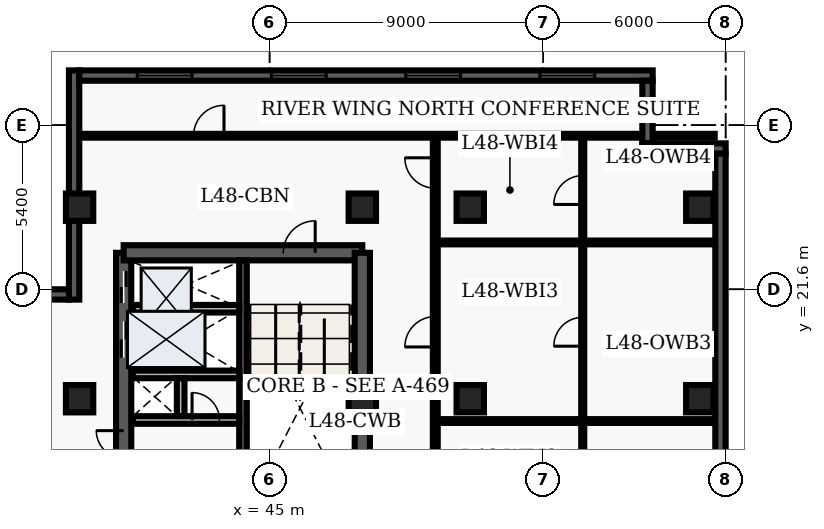
"""IFC4 building model, lengths in metres.
Left out: names, types, materials, properties, quantities, classifications, styles, units other than length and angle.
Written with IfcOpenShell. Run it as: python <this file> out.ifc"""

import sys

from ifc_helpers import new_model, entity, si_unit, converted_unit, direction, frame, origin_with_axes, origin_2d_with_axis, place, context, subcontext, project, spatial, polyline, rectangle, outline, extrude, element, fill, save


model = new_model("IFC4")
c1 = context("Model", 3, precision=1e-05, world=origin_with_axes(), true_north=direction((0.0, 1.0)))
c2 = subcontext(c1, "Body", "Model", "MODEL_VIEW")
j1 = project(units=[si_unit("LENGTHUNIT", "METRE"), converted_unit("PLANEANGLEUNIT", "DEGREE", entity("IfcPlaneAngleMeasure", 0.017), si_unit("PLANEANGLEUNIT", "RADIAN"), dimensions=[0, 0, 0, 0, 0, 0, 0])], contexts=[c1])
p1 = place(None, origin_with_axes())
s1 = spatial("IfcSite", under=j1, at=p1, CompositionType="ELEMENT")
p2 = place(p1, origin_with_axes())
s2 = spatial("IfcBuilding", under=s1, at=p2, CompositionType="ELEMENT")
p3 = place(p2, frame((0.0, 0.0, 196.5), z_axis=(0.0, 0.0, 1.0), x_axis=(1.0, 0.0, 0.0)))
s3 = spatial("IfcBuildingStorey", under=s2, at=p3, CompositionType="ELEMENT", Elevation=196.5)
p4 = place(p3, frame((40.2, 7.2, 0.0), z_axis=(0.0, 0.0, 1.0), x_axis=(0.0, 1.0, 0.0)))
e1 = element("IfcWall", 1, at=p4, inside=s3, PredefinedType="SHEAR", context=c2, shape_type="SweptSolid", body=[
    extrude(outline(polyline([(0.0, -0.25), (15.6, -0.25), (15.6, 0.25), (0.0, 0.25), (0.0, -0.25)])), origin_with_axes(), (0.0, 0.0, 1.0), 3.66),
])
p5 = place(p4, frame((14.475, 0.0, 0.0), z_axis=(0.0, 0.0, 1.0), x_axis=(1.0, 0.0, 0.0)))
e2 = element("IfcOpeningElement", 2, at=p5, cuts=e1, PredefinedType="OPENING", context=c2, shape_type="SweptSolid", body=[
    extrude(rectangle(XDim=1.05, YDim=0.52, at=origin_2d_with_axis()), origin_with_axes(), (0.0, 0.0, 1.0), 2.15),
])
p6 = place(p4, frame((12.75, 0.0, 0.0), z_axis=(0.0, 0.0, 1.0), x_axis=(1.0, 0.0, 0.0)))
e3 = element("IfcOpeningElement", 3, at=p6, cuts=e1, PredefinedType="OPENING", context=c2, shape_type="SweptSolid", body=[
    extrude(rectangle(XDim=1.2, YDim=0.52, at=origin_2d_with_axis()), origin_with_axes(), (0.0, 0.0, 1.0), 2.15),
])
p7 = place(p4, frame((9.3, 0.0, 0.0), z_axis=(0.0, 0.0, 1.0), x_axis=(1.0, 0.0, 0.0)))
e4 = element("IfcOpeningElement", 4, at=p7, cuts=e1, PredefinedType="OPENING", context=c2, shape_type="SweptSolid", body=[
    extrude(rectangle(XDim=0.9, YDim=0.52, at=origin_2d_with_axis()), origin_with_axes(), (0.0, 0.0, 1.0), 2.15),
])
p8 = place(p3, frame((40.2, 22.8, 0.0), z_axis=(0.0, 0.0, 1.0), x_axis=(1.0, 0.0, 0.0)))
e5 = element("IfcWall", 5, at=p8, inside=s3, PredefinedType="SHEAR", context=c2, shape_type="SweptSolid", body=[
    extrude(outline(polyline([(0.0, -0.25), (7.85, -0.25), (7.85, 0.25), (0.0, 0.25), (0.0, -0.25)])), origin_with_axes(), (0.0, 0.0, 1.0), 3.66),
])
p9 = place(p8, frame((5.775, 0.0, 0.0), z_axis=(0.0, 0.0, 1.0), x_axis=(1.0, 0.0, 0.0)))
e6 = element("IfcOpeningElement", 6, at=p9, cuts=e5, PredefinedType="OPENING", context=c2, shape_type="SweptSolid", body=[
    extrude(rectangle(XDim=1.05, YDim=0.52, at=origin_2d_with_axis()), origin_with_axes(), (0.0, 0.0, 1.0), 2.15),
])
p10 = place(p3, frame((48.05, 7.2, 0.0), z_axis=(0.0, 0.0, 1.0), x_axis=(0.0, 1.0, 0.0)))
e7 = element("IfcWall", 7, at=p10, inside=s3, PredefinedType="SHEAR", context=c2, shape_type="SweptSolid", body=[
    extrude(outline(polyline([(0.0, -0.25), (15.6, -0.25), (15.6, 0.25), (0.0, 0.25), (0.0, -0.25)])), origin_with_axes(), (0.0, 0.0, 1.0), 3.66),
])
p11 = place(p10, frame((5.975, 0.0, 0.0), z_axis=(0.0, 0.0, 1.0), x_axis=(1.0, 0.0, 0.0)))
e8 = element("IfcOpeningElement", 8, at=p11, cuts=e7, PredefinedType="OPENING", context=c2, shape_type="SweptSolid", body=[
    extrude(rectangle(XDim=1.05, YDim=0.52, at=origin_2d_with_axis()), origin_with_axes(), (0.0, 0.0, 1.0), 2.15),
])
p12 = place(p10, frame((2.725, 0.0, 0.0), z_axis=(0.0, 0.0, 1.0), x_axis=(1.0, 0.0, 0.0)))
e9 = element("IfcOpeningElement", 9, at=p12, cuts=e7, PredefinedType="OPENING", context=c2, shape_type="SweptSolid", body=[
    extrude(rectangle(XDim=0.95, YDim=0.52, at=origin_2d_with_axis()), origin_with_axes(), (0.0, 0.0, 1.0), 2.15),
])
p13 = place(p3, frame((44.125, 7.45, 0.0), z_axis=(0.0, 0.0, 1.0), x_axis=(0.0, 1.0, 0.0)))
e10 = element("IfcWall", 10, at=p13, inside=s3, PredefinedType="SHEAR", context=c2, shape_type="SweptSolid", body=[
    extrude(outline(polyline([(0.0, -0.125), (15.1, -0.125), (15.1, 0.125), (0.0, 0.125), (0.0, -0.125)])), origin_with_axes(), (0.0, 0.0, 1.0), 3.66),
])
p14 = place(p3, frame((40.5, 17.3, 0.0), z_axis=(0.0, 0.0, 1.0), x_axis=(1.0, 0.0, 0.0)))
e11 = element("IfcWall", 11, at=p14, inside=s3, PredefinedType="SOLIDWALL", context=c2, shape_type="SweptSolid", body=[
    extrude(outline(polyline([(0.0, -0.125), (3.5, -0.125), (3.5, 0.125), (0.0, 0.125), (0.0, -0.125)])), origin_with_axes(), (0.0, 0.0, 1.0), 2.7),
])
p15 = place(p14, frame((2.4, 0.0, 0.0), z_axis=(0.0, 0.0, 1.0), x_axis=(1.0, 0.0, 0.0)))
e12 = element("IfcOpeningElement", 12, at=p15, cuts=e11, PredefinedType="OPENING", context=c2, shape_type="SweptSolid", body=[
    extrude(rectangle(XDim=0.9, YDim=0.27, at=origin_2d_with_axis()), origin_with_axes(), (0.0, 0.0, 1.0), 2.15),
])
p16 = place(p3, frame((40.5, 18.8, 0.0), z_axis=(0.0, 0.0, 1.0), x_axis=(1.0, 0.0, 0.0)))
e13 = element("IfcWall", 13, at=p16, inside=s3, PredefinedType="SOLIDWALL", context=c2, shape_type="SweptSolid", body=[
    extrude(outline(polyline([(0.0, -0.125), (3.5, -0.125), (3.5, 0.125), (0.0, 0.125), (0.0, -0.125)])), origin_with_axes(), (0.0, 0.0, 1.0), 2.7),
])
p17 = place(p3, frame((42.075, 17.43, 0.0), z_axis=(0.0, 0.0, 1.0), x_axis=(0.0, 1.0, 0.0)))
e14 = element("IfcWall", 14, at=p17, inside=s3, PredefinedType="SOLIDWALL", context=c2, shape_type="SweptSolid", body=[
    extrude(outline(polyline([(0.0, -0.125), (1.24, -0.125), (1.24, 0.125), (0.0, 0.125), (0.0, -0.125)])), origin_with_axes(), (0.0, 0.0, 1.0), 2.7),
])
for number, where, z_axis, x_axis in (
    (15, (38.75, 18.0, 0.0), (0.0, 0.0, 1.0), (1.0, 0.0, 0.0)),
    (16, (38.75, 24.3, 0.0), (0.0, 0.0, 1.0), (1.0, 0.0, 0.0)),
    (17, (48.05, 18.0, 0.0), (0.0, 0.0, 1.0), (1.0, 0.0, 0.0)),
    (18, (48.05, 24.3, 0.0), (0.0, 0.0, 1.0), (1.0, 0.0, 0.0)),
    (19, (51.6, 18.0, 0.0), (0.0, 0.0, 1.0), (1.0, 0.0, 0.0)),
    (20, (51.6, 24.3, 0.0), (0.0, 0.0, 1.0), (1.0, 0.0, 0.0)),
    (21, (59.15, 18.0, 0.0), (0.0, 0.0, 1.0), (1.0, 0.0, 0.0)),
    (22, (59.15, 24.3, 0.0), (0.0, 0.0, 1.0), (1.0, 0.0, 0.0)),
):
    element("IfcColumn", number, at=place(p3, frame(where, z_axis=z_axis, x_axis=x_axis)), inside=s3, PredefinedType="COLUMN", context=c2, shape_type="SweptSolid", body=[
        extrude(rectangle(XDim=0.9, YDim=0.9, at=origin_2d_with_axis()), origin_with_axes(), (0.0, 0.0, 1.0), 3.9),
    ])
p18 = place(p3, frame((40.5, 20.96, 0.0), z_axis=(0.0, 0.0, 1.0), x_axis=(1.0, 0.0, 0.0)))
e23 = element("IfcWall", 23, at=p18, inside=s3, PredefinedType="SOLIDWALL", context=c2, shape_type="SweptSolid", body=[
    extrude(outline(polyline([(0.0, -0.125), (3.5, -0.125), (3.5, 0.125), (0.0, 0.125), (0.0, -0.125)])), origin_with_axes(), (0.0, 0.0, 1.0), 2.7),
])
p19 = place(p3, frame((50.45, 7.85, 0.0), z_axis=(0.0, 0.0, 1.0), x_axis=(0.0, 1.0, 0.0)))
e24 = element("IfcWall", 24, at=p19, inside=s3, PredefinedType="PARTITIONING", context=c2, shape_type="SweptSolid", body=[
    extrude(outline(polyline([(0.0, -0.08), (18.8, -0.08), (18.8, 0.08), (0.0, 0.08), (0.0, -0.08)])), origin_with_axes(), (0.0, 0.0, 1.0), 2.7),
])
p20 = place(p19, frame((0.96, 0.0, 0.0), z_axis=(0.0, 0.0, 1.0), x_axis=(1.0, 0.0, 0.0)))
e25 = element("IfcOpeningElement", 25, at=p20, cuts=e24, PredefinedType="OPENING", context=c2, shape_type="SweptSolid", body=[
    extrude(rectangle(XDim=0.9, YDim=0.18, at=origin_2d_with_axis()), origin_with_axes(), (0.0, 0.0, 1.0), 2.15),
])
p21 = place(p19, frame((6.888, 0.0, 0.0), z_axis=(0.0, 0.0, 1.0), x_axis=(1.0, 0.0, 0.0)))
e26 = element("IfcOpeningElement", 26, at=p21, cuts=e24, PredefinedType="OPENING", context=c2, shape_type="SweptSolid", body=[
    extrude(rectangle(XDim=1.0, YDim=0.18, at=origin_2d_with_axis()), origin_with_axes(), (0.0, 0.0, 1.0), 2.15),
])
p22 = place(p19, frame((12.353, 0.0, 0.0), z_axis=(0.0, 0.0, 1.0), x_axis=(1.0, 0.0, 0.0)))
e27 = element("IfcOpeningElement", 27, at=p22, cuts=e24, PredefinedType="OPENING", context=c2, shape_type="SweptSolid", body=[
    extrude(rectangle(XDim=1.0, YDim=0.18, at=origin_2d_with_axis()), origin_with_axes(), (0.0, 0.0, 1.0), 2.15),
])
p23 = place(p19, frame((17.575, 0.0, 0.0), z_axis=(0.0, 0.0, 1.0), x_axis=(1.0, 0.0, 0.0)))
e28 = element("IfcOpeningElement", 28, at=p23, cuts=e24, PredefinedType="OPENING", context=c2, shape_type="SweptSolid", body=[
    extrude(rectangle(XDim=1.0, YDim=0.18, at=origin_2d_with_axis()), origin_with_axes(), (0.0, 0.0, 1.0), 2.15),
])
p24 = place(p3, frame((38.735, 26.65, 0.0), z_axis=(0.0, 0.0, 1.0), x_axis=(1.0, 0.0, 0.0)))
e29 = element("IfcWall", 29, at=p24, inside=s3, PredefinedType="PARTITIONING", context=c2, shape_type="SweptSolid", body=[
    extrude(outline(polyline([(0.0, -0.062), (20.905, -0.062), (20.905, 0.062), (0.0, 0.062), (0.0, -0.062)])), origin_with_axes(), (0.0, 0.0, 1.0), 2.7),
])
p25 = place(p24, frame((4.265, 0.0, 0.0), z_axis=(0.0, 0.0, 1.0), x_axis=(1.0, 0.0, 0.0)))
e30 = element("IfcOpeningElement", 30, at=p25, cuts=e29, PredefinedType="OPENING", context=c2, shape_type="SweptSolid", body=[
    extrude(rectangle(XDim=1.0, YDim=0.145, at=origin_2d_with_axis()), origin_with_axes(), (0.0, 0.0, 1.0), 2.15),
])
p26 = place(p3, frame((55.3, 7.98, 0.0), z_axis=(0.0, 0.0, 1.0), x_axis=(0.0, 1.0, 0.0)))
e31 = element("IfcWall", 31, at=p26, inside=s3, PredefinedType="PARTITIONING", context=c2, shape_type="SweptSolid", body=[
    extrude(outline(polyline([(0.0, -0.05), (18.54, -0.05), (18.54, 0.05), (0.0, 0.05), (0.0, -0.05)])), origin_with_axes(), (0.0, 0.0, 1.0), 2.7),
])
p27 = place(p26, frame((2.079, 0.0, 0.0), z_axis=(0.0, 0.0, 1.0), x_axis=(1.0, 0.0, 0.0)))
e32 = element("IfcOpeningElement", 32, at=p27, cuts=e31, PredefinedType="OPENING", context=c2, shape_type="SweptSolid", body=[
    extrude(rectangle(XDim=0.95, YDim=0.12, at=origin_2d_with_axis()), origin_with_axes(), (0.0, 0.0, 1.0), 2.15),
])
p28 = place(p26, frame((6.758, 0.0, 0.0), z_axis=(0.0, 0.0, 1.0), x_axis=(1.0, 0.0, 0.0)))
e33 = element("IfcOpeningElement", 33, at=p28, cuts=e31, PredefinedType="OPENING", context=c2, shape_type="SweptSolid", body=[
    extrude(rectangle(XDim=0.95, YDim=0.12, at=origin_2d_with_axis()), origin_with_axes(), (0.0, 0.0, 1.0), 2.15),
])
p29 = place(p26, frame((12.223, 0.0, 0.0), z_axis=(0.0, 0.0, 1.0), x_axis=(1.0, 0.0, 0.0)))
e34 = element("IfcOpeningElement", 34, at=p29, cuts=e31, PredefinedType="OPENING", context=c2, shape_type="SweptSolid", body=[
    extrude(rectangle(XDim=0.95, YDim=0.12, at=origin_2d_with_axis()), origin_with_axes(), (0.0, 0.0, 1.0), 2.15),
])
p30 = place(p26, frame((16.885, 0.0, 0.0), z_axis=(0.0, 0.0, 1.0), x_axis=(1.0, 0.0, 0.0)))
e35 = element("IfcOpeningElement", 35, at=p30, cuts=e31, PredefinedType="OPENING", context=c2, shape_type="SweptSolid", body=[
    extrude(rectangle(XDim=0.95, YDim=0.12, at=origin_2d_with_axis()), origin_with_axes(), (0.0, 0.0, 1.0), 2.15),
])
for number, where, z_axis, x_axis in (
    (36, (50.57, 17.266, 0.0), (0.0, 0.0, 1.0), (1.0, 0.0, 0.0)),
    (37, (50.57, 23.14, 0.0), (0.0, 0.0, 1.0), (1.0, 0.0, 0.0)),
):
    element("IfcWall", number, at=place(p3, frame(where, z_axis=z_axis, x_axis=x_axis)), inside=s3, PredefinedType="PARTITIONING", context=c2, shape_type="SweptSolid", body=[
        extrude(outline(polyline([(0.0, -0.062), (9.095, -0.062), (9.095, 0.062), (0.0, 0.062), (0.0, -0.062)])), origin_with_axes(), (0.0, 0.0, 1.0), 2.7),
    ])
p31 = place(p3, frame((38.57, 21.26, 0.0), z_axis=(0.0, 0.0, 1.0), x_axis=(0.0, 1.0, 0.0)))
e38 = element("IfcWall", 38, at=p31, inside=s3, PredefinedType="SOLIDWALL", context=c2, shape_type="SweptSolid", body=[
    extrude(outline(polyline([(0.0, -0.17), (7.54, -0.17), (7.54, 0.17), (0.0, 0.17), (0.0, -0.17)])), origin_with_axes(), (0.0, 0.0, 1.0), 3.66),
])
p32 = place(p3, frame((38.74, 28.63, 0.0), z_axis=(0.0, 0.0, 1.0), x_axis=(1.0, 0.0, 0.0)))
e39 = element("IfcWall", 39, at=p32, inside=s3, PredefinedType="SOLIDWALL", context=c2, shape_type="SweptSolid", body=[
    extrude(outline(polyline([(0.0, -0.17), (18.86, -0.17), (18.86, 0.17), (0.0, 0.17), (0.0, -0.17)])), origin_with_axes(), (0.0, 0.0, 1.0), 3.66),
])
p33 = place(p32, frame((2.808, 0.0, 0.45), z_axis=(0.0, 0.0, 1.0), x_axis=(1.0, 0.0, 0.0)))
e40 = element("IfcOpeningElement", 40, at=p33, cuts=e39, PredefinedType="OPENING", context=c2, shape_type="SweptSolid", body=[
    extrude(rectangle(XDim=1.8, YDim=0.36, at=origin_2d_with_axis()), origin_with_axes(), (0.0, 0.0, 1.0), 2.1),
])
p34 = place(p32, frame((7.222, 0.0, 0.45), z_axis=(0.0, 0.0, 1.0), x_axis=(1.0, 0.0, 0.0)))
e41 = element("IfcOpeningElement", 41, at=p34, cuts=e39, PredefinedType="OPENING", context=c2, shape_type="SweptSolid", body=[
    extrude(rectangle(XDim=1.8, YDim=0.36, at=origin_2d_with_axis()), origin_with_axes(), (0.0, 0.0, 1.0), 2.1),
])
p35 = place(p32, frame((11.637, 0.0, 0.45), z_axis=(0.0, 0.0, 1.0), x_axis=(1.0, 0.0, 0.0)))
e42 = element("IfcOpeningElement", 42, at=p35, cuts=e39, PredefinedType="OPENING", context=c2, shape_type="SweptSolid", body=[
    extrude(rectangle(XDim=1.8, YDim=0.36, at=origin_2d_with_axis()), origin_with_axes(), (0.0, 0.0, 1.0), 2.1),
])
p36 = place(p32, frame((16.053, 0.0, 0.45), z_axis=(0.0, 0.0, 1.0), x_axis=(1.0, 0.0, 0.0)))
e43 = element("IfcOpeningElement", 43, at=p36, cuts=e39, PredefinedType="OPENING", context=c2, shape_type="SweptSolid", body=[
    extrude(rectangle(XDim=1.8, YDim=0.36, at=origin_2d_with_axis()), origin_with_axes(), (0.0, 0.0, 1.0), 2.1),
])
p37 = place(p3, frame((57.43, 28.46, 0.0), z_axis=(0.0, 0.0, 1.0), x_axis=(0.0, -1.0, 0.0)))
e44 = element("IfcWall", 44, at=p37, inside=s3, PredefinedType="SOLIDWALL", context=c2, shape_type="SweptSolid", body=[
    extrude(outline(polyline([(0.0, -0.17), (2.06, -0.17), (2.06, 0.17), (0.0, 0.17), (0.0, -0.17)])), origin_with_axes(), (0.0, 0.0, 1.0), 3.66),
])
p38 = place(p3, frame((57.26, 26.23, 0.0), z_axis=(0.0, 0.0, 1.0), x_axis=(1.0, 0.0, 0.0)))
e45 = element("IfcWall", 45, at=p38, inside=s3, PredefinedType="SOLIDWALL", context=c2, shape_type="SweptSolid", body=[
    extrude(outline(polyline([(0.0, -0.17), (2.74, -0.17), (2.74, 0.17), (0.0, 0.17), (0.0, -0.17)])), origin_with_axes(), (0.0, 0.0, 1.0), 3.66),
])
p39 = place(p3, frame((59.83, 26.06, 0.0), z_axis=(0.0, 0.0, 1.0), x_axis=(0.0, -1.0, 0.0)))
e46 = element("IfcWall", 46, at=p39, inside=s3, PredefinedType="SOLIDWALL", context=c2, shape_type="SweptSolid", body=[
    extrude(outline(polyline([(0.0, -0.17), (23.66, -0.17), (23.66, 0.17), (0.0, 0.17), (0.0, -0.17)])), origin_with_axes(), (0.0, 0.0, 1.0), 3.66),
])
p40 = place(p39, frame((11.83, 0.0, 0.45), z_axis=(0.0, 0.0, 1.0), x_axis=(1.0, 0.0, 0.0)))
e47 = element("IfcOpeningElement", 47, at=p40, cuts=e46, PredefinedType="OPENING", context=c2, shape_type="SweptSolid", body=[
    extrude(rectangle(XDim=1.8, YDim=0.36, at=origin_2d_with_axis()), origin_with_axes(), (0.0, 0.0, 1.0), 2.1),
])
p41 = place(p39, frame((20.364, 0.0, 0.45), z_axis=(0.0, 0.0, 1.0), x_axis=(1.0, 0.0, 0.0)))
e48 = element("IfcOpeningElement", 48, at=p41, cuts=e46, PredefinedType="OPENING", context=c2, shape_type="SweptSolid", body=[
    extrude(rectangle(XDim=1.8, YDim=0.36, at=origin_2d_with_axis()), origin_with_axes(), (0.0, 0.0, 1.0), 2.1),
])
p42 = place(p3, frame((28.039, 21.43, 0.0), z_axis=(0.0, 0.0, 1.0), x_axis=(1.0, 0.0, 0.0)))
e49 = element("IfcWall", 49, at=p42, inside=s3, PredefinedType="SOLIDWALL", context=c2, shape_type="SweptSolid", body=[
    extrude(outline(polyline([(0.0, -0.17), (10.361, -0.17), (10.361, 0.17), (0.0, 0.17), (0.0, -0.17)])), origin_with_axes(), (0.0, 0.0, 1.0), 3.66),
])
p43 = place(p42, frame((2.89, 0.0, 0.45), z_axis=(0.0, 0.0, 1.0), x_axis=(1.0, 0.0, 0.0)))
e50 = element("IfcOpeningElement", 50, at=p43, cuts=e49, PredefinedType="OPENING", context=c2, shape_type="SweptSolid", body=[
    extrude(rectangle(XDim=1.8, YDim=0.36, at=origin_2d_with_axis()), origin_with_axes(), (0.0, 0.0, 1.0), 2.1),
])
p44 = place(p42, frame((6.621, 0.0, 0.45), z_axis=(0.0, 0.0, 1.0), x_axis=(1.0, 0.0, 0.0)))
e51 = element("IfcOpeningElement", 51, at=p44, cuts=e49, PredefinedType="OPENING", context=c2, shape_type="SweptSolid", body=[
    extrude(rectangle(XDim=1.8, YDim=0.36, at=origin_2d_with_axis()), origin_with_axes(), (0.0, 0.0, 1.0), 2.1),
])
p45 = place(p4, frame((14.475, 0.0, 0.0), z_axis=(0.0, 0.0, 1.0), x_axis=(1.0, 0.0, 0.0)))
e52 = element("IfcDoor", 52, at=p45, inside=s3, OperationType="SLIDING_TO_RIGHT", PredefinedType="DOOR", context=c2, shape_type="SweptSolid", body=[
    extrude(rectangle(XDim=1.05, YDim=0.09, at=origin_2d_with_axis()), origin_with_axes(), (0.0, 0.0, 1.0), 2.15),
])
fill(e2, e52)
p46 = place(p4, frame((12.75, 0.0, 0.0), z_axis=(0.0, 0.0, 1.0), x_axis=(1.0, 0.0, 0.0)))
e53 = element("IfcDoor", 53, at=p46, inside=s3, OperationType="DOUBLE_DOOR_SLIDING", PredefinedType="DOOR", context=c2, shape_type="SweptSolid", body=[
    extrude(rectangle(XDim=1.2, YDim=0.09, at=origin_2d_with_axis()), origin_with_axes(), (0.0, 0.0, 1.0), 2.15),
])
fill(e3, e53)
p47 = place(p4, frame((9.3, 0.0, 0.0), z_axis=(0.0, 0.0, 1.0), x_axis=(1.0, 0.0, 0.0)))
e54 = element("IfcDoor", 54, at=p47, inside=s3, OperationType="SINGLE_SWING_RIGHT", PredefinedType="DOOR", context=c2, shape_type="SweptSolid", body=[
    extrude(rectangle(XDim=0.9, YDim=0.09, at=origin_2d_with_axis()), origin_with_axes(), (0.0, 0.0, 1.0), 2.15),
])
fill(e4, e54)
p48 = place(p14, frame((2.4, 0.0, 0.0), z_axis=(0.0, 0.0, 1.0), x_axis=(1.0, 0.0, 0.0)))
e55 = element("IfcDoor", 55, at=p48, inside=s3, OperationType="SINGLE_SWING_LEFT", PredefinedType="DOOR", context=c2, shape_type="SweptSolid", body=[
    extrude(rectangle(XDim=0.9, YDim=0.09, at=origin_2d_with_axis()), origin_with_axes(), (0.0, 0.0, 1.0), 2.15),
])
fill(e12, e55)
p49 = place(p8, frame((5.775, 0.0, 0.0), z_axis=(0.0, 0.0, 1.0), x_axis=(1.0, 0.0, 0.0)))
e56 = element("IfcDoor", 56, at=p49, inside=s3, OperationType="SINGLE_SWING_RIGHT", PredefinedType="DOOR", context=c2, shape_type="SweptSolid", body=[
    extrude(rectangle(XDim=1.05, YDim=0.09, at=origin_2d_with_axis()), origin_with_axes(), (0.0, 0.0, 1.0), 2.15),
])
fill(e6, e56)
p50 = place(p24, frame((4.265, 0.0, 0.0), z_axis=(0.0, 0.0, 1.0), x_axis=(1.0, 0.0, 0.0)))
e57 = element("IfcDoor", 57, at=p50, inside=s3, OperationType="SINGLE_SWING_RIGHT", PredefinedType="DOOR", context=c2, shape_type="SweptSolid", body=[
    extrude(rectangle(XDim=1.0, YDim=0.075, at=origin_2d_with_axis()), origin_with_axes(), (0.0, 0.0, 1.0), 2.15),
])
fill(e30, e57)
p51 = place(p26, frame((12.223, 0.0, 0.0), z_axis=(0.0, 0.0, 1.0), x_axis=(1.0, 0.0, 0.0)))
e58 = element("IfcDoor", 58, at=p51, inside=s3, OperationType="SINGLE_SWING_LEFT", PredefinedType="DOOR", context=c2, shape_type="SweptSolid", body=[
    extrude(rectangle(XDim=0.95, YDim=0.06, at=origin_2d_with_axis()), origin_with_axes(), (0.0, 0.0, 1.0), 2.15),
])
fill(e34, e58)
p52 = place(p19, frame((12.353, 0.0, 0.0), z_axis=(0.0, 0.0, 1.0), x_axis=(1.0, 0.0, 0.0)))
e59 = element("IfcDoor", 59, at=p52, inside=s3, OperationType="SINGLE_SWING_LEFT", PredefinedType="DOOR", context=c2, shape_type="SweptSolid", body=[
    extrude(rectangle(XDim=1.0, YDim=0.09, at=origin_2d_with_axis()), origin_with_axes(), (0.0, 0.0, 1.0), 2.15),
])
fill(e27, e59)
p53 = place(p26, frame((16.885, 0.0, 0.0), z_axis=(0.0, 0.0, 1.0), x_axis=(1.0, 0.0, 0.0)))
e60 = element("IfcDoor", 60, at=p53, inside=s3, OperationType="SINGLE_SWING_LEFT", PredefinedType="DOOR", context=c2, shape_type="SweptSolid", body=[
    extrude(rectangle(XDim=0.95, YDim=0.06, at=origin_2d_with_axis()), origin_with_axes(), (0.0, 0.0, 1.0), 2.15),
])
fill(e35, e60)
p54 = place(p19, frame((17.575, 0.0, 0.0), z_axis=(0.0, 0.0, 1.0), x_axis=(1.0, 0.0, 0.0)))
e61 = element("IfcDoor", 61, at=p54, inside=s3, OperationType="SINGLE_SWING_RIGHT", PredefinedType="DOOR", context=c2, shape_type="SweptSolid", body=[
    extrude(rectangle(XDim=1.0, YDim=0.09, at=origin_2d_with_axis()), origin_with_axes(), (0.0, 0.0, 1.0), 2.15),
])
fill(e28, e61)
p55 = place(p32, frame((2.808, 0.0, 0.45), z_axis=(0.0, 0.0, 1.0), x_axis=(1.0, 0.0, 0.0)))
e62 = element("IfcWindow", 62, at=p55, inside=s3, PredefinedType="WINDOW", context=c2, shape_type="SweptSolid", body=[
    extrude(rectangle(XDim=1.8, YDim=0.09, at=origin_2d_with_axis()), origin_with_axes(), (0.0, 0.0, 1.0), 2.1),
])
fill(e40, e62)
p56 = place(p32, frame((7.222, 0.0, 0.45), z_axis=(0.0, 0.0, 1.0), x_axis=(1.0, 0.0, 0.0)))
e63 = element("IfcWindow", 63, at=p56, inside=s3, PredefinedType="WINDOW", context=c2, shape_type="SweptSolid", body=[
    extrude(rectangle(XDim=1.8, YDim=0.09, at=origin_2d_with_axis()), origin_with_axes(), (0.0, 0.0, 1.0), 2.1),
])
fill(e41, e63)
p57 = place(p32, frame((11.637, 0.0, 0.45), z_axis=(0.0, 0.0, 1.0), x_axis=(1.0, 0.0, 0.0)))
e64 = element("IfcWindow", 64, at=p57, inside=s3, PredefinedType="WINDOW", context=c2, shape_type="SweptSolid", body=[
    extrude(rectangle(XDim=1.8, YDim=0.09, at=origin_2d_with_axis()), origin_with_axes(), (0.0, 0.0, 1.0), 2.1),
])
fill(e42, e64)
p58 = place(p32, frame((16.053, 0.0, 0.45), z_axis=(0.0, 0.0, 1.0), x_axis=(1.0, 0.0, 0.0)))
e65 = element("IfcWindow", 65, at=p58, inside=s3, PredefinedType="WINDOW", context=c2, shape_type="SweptSolid", body=[
    extrude(rectangle(XDim=1.8, YDim=0.09, at=origin_2d_with_axis()), origin_with_axes(), (0.0, 0.0, 1.0), 2.1),
])
fill(e43, e65)
save(model, sys.argv[1])
